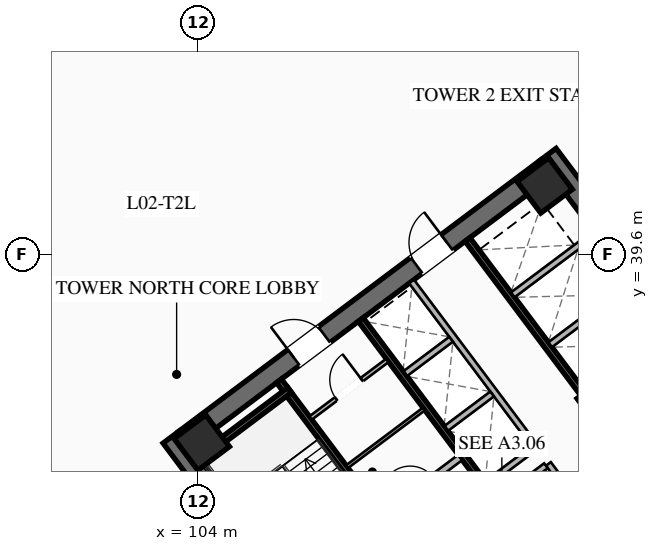
"""IFC4 building model, lengths in metres.
Left out: names, types, materials, properties, quantities, classifications, styles, units other than length and angle.
Written with IfcOpenShell. Run it as: python <this file> out.ifc"""

import sys

from ifc_helpers import new_model, si_unit, direction, frame, frame_2d, origin, origin_2d, place, context, subcontext, project, spatial, rectangle, hollow_rectangle, extrude, element, fill, save


model = new_model("IFC4")
c1 = context("Model", 3, precision=1e-05, world=origin(), true_north=direction((0.0, 1.0)))
c2 = subcontext(c1, "Body", "Model", "MODEL_VIEW")
j1 = project(units=[si_unit("LENGTHUNIT", "METRE"), si_unit("PLANEANGLEUNIT", "RADIAN")], contexts=[c1])
p1 = place(None, origin())
s1 = spatial("IfcSite", under=j1, at=p1, CompositionType="ELEMENT")
p2 = place(p1, origin())
s2 = spatial("IfcBuilding", under=s1, at=p2, CompositionType="ELEMENT")
p3 = place(p2, frame((0.0, 0.0, 10.2)))
s3 = spatial("IfcBuildingStorey", under=s2, at=p3, CompositionType="ELEMENT", Elevation=10.2)
for number, where, z_axis, x_axis in (
    (1, (112.476, 21.107, 0.0), (0.0, 0.0, 1.0), (-0.6, 0.8, 0.0)),
    (2, (115.524, 42.893, 0.0), (0.0, 0.0, 1.0), (0.6, -0.8, 0.0)),
):
    element("IfcWall", number, at=place(p3, frame(where, z_axis=z_axis, x_axis=x_axis)), inside=s3, PredefinedType="SHEAR", context=c2, shape_type="SweptSolid", body=[
        extrude(rectangle(XDim=15.6, YDim=0.65, at=frame_2d((7.8, 0.0))), origin(), (0.0, 0.0, 1.0), 5.4),
    ])
p4 = place(p3, frame((103.571, 33.522, 0.0), z_axis=(0.0, 0.0, 1.0), x_axis=(0.799998028465, 0.600002628705, 0.0)))
e3 = element("IfcWall", 3, at=p4, inside=s3, PredefinedType="SHEAR", context=c2, shape_type="SweptSolid", body=[
    extrude(rectangle(XDim=14.86, YDim=0.65, at=frame_2d((7.43, 0.0))), origin(), (0.0, 0.0, 1.0), 5.4),
])
p5 = place(p4, frame((4.48, 0.0, 0.0)))
e4 = element("IfcOpeningElement", 4, at=p5, cuts=e3, PredefinedType="OPENING", context=c2, shape_type="SweptSolid", body=[
    extrude(rectangle(XDim=1.25, YDim=2.25, at=frame_2d((0.625, 1.125))), frame((0.0, 0.335, 0.0), z_axis=(0.0, -1.0, 0.0), x_axis=(1.0, 0.0, 0.0)), (0.0, 0.0, 1.0), 0.67),
])
p6 = place(p4, frame((9.53, 0.0, 0.0)))
e5 = element("IfcOpeningElement", 5, at=p6, cuts=e3, PredefinedType="OPENING", context=c2, shape_type="SweptSolid", body=[
    extrude(rectangle(XDim=1.25, YDim=2.25, at=frame_2d((0.625, 1.125))), frame((0.0, 0.335, 0.0), z_axis=(0.0, -1.0, 0.0), x_axis=(1.0, 0.0, 0.0)), (0.0, 0.0, 1.0), 0.67),
])
for number, where, z_axis, x_axis in (
    (6, (115.41, 41.87, 0.0), (0.0, 0.0, 1.0), (0.8, 0.6, 0.0)),
    (7, (104.13, 33.41, 0.0), (0.0, 0.0, 1.0), (0.8, 0.6, 0.0)),
):
    element("IfcColumn", number, at=place(p3, frame(where, z_axis=z_axis, x_axis=x_axis)), inside=s3, PredefinedType="COLUMN", context=c2, shape_type="SweptSolid", body=[
        extrude(hollow_rectangle(XDim=1.3, YDim=1.3, WallThickness=0.05, at=origin_2d()), origin(), (0.0, 0.0, 1.0), 5.14),
    ])
p7 = place(p3, frame((111.44, 29.08, 0.0), z_axis=(0.0, 0.0, 1.0), x_axis=(-0.600009827119, 0.799992629566, 0.0)))
e8 = element("IfcWall", 8, at=p7, inside=s3, PredefinedType="SHEAR", context=c2, shape_type="SweptSolid", body=[
    extrude(rectangle(XDim=7.95, YDim=0.2, at=frame_2d((3.975, 0.0))), origin(), (0.0, 0.0, 1.0), 5.14),
])
p8 = place(p7, frame((0.45, 0.0, 0.0)))
e9 = element("IfcOpeningElement", 9, at=p8, cuts=e8, PredefinedType="OPENING", context=c2, shape_type="SweptSolid", body=[
    extrude(rectangle(XDim=1.15, YDim=2.2, at=frame_2d((0.575, 1.1))), frame((0.0, 0.11, 0.0), z_axis=(0.0, -1.0, 0.0), x_axis=(1.0, 0.0, 0.0)), (0.0, 0.0, 1.0), 0.22),
])
p9 = place(p3, frame((104.036, 32.902, 0.0), z_axis=(0.0, 0.0, 1.0), x_axis=(0.800039270442, 0.59994763584, 0.0)))
e10 = element("IfcWall", 10, at=p9, inside=s3, PredefinedType="SHEAR", context=c2, shape_type="SweptSolid", body=[
    extrude(rectangle(XDim=3.73, YDim=0.2, at=frame_2d((1.865, 0.0))), origin(), (0.0, 0.0, 1.0), 5.14),
])
p10 = place(p3, frame((116.56, 34.92, 0.0), z_axis=(0.0, 0.0, 1.0), x_axis=(0.600009827119, -0.799992629566, 0.0)))
e11 = element("IfcWall", 11, at=p10, inside=s3, PredefinedType="SHEAR", context=c2, shape_type="SweptSolid", body=[
    extrude(rectangle(XDim=7.95, YDim=0.2, at=frame_2d((3.975, 0.0))), origin(), (0.0, 0.0, 1.0), 5.14),
])
p11 = place(p10, frame((0.45, 0.0, 0.0)))
e12 = element("IfcOpeningElement", 12, at=p11, cuts=e11, PredefinedType="OPENING", context=c2, shape_type="SweptSolid", body=[
    extrude(rectangle(XDim=1.15, YDim=2.2, at=frame_2d((0.575, 1.1))), frame((0.0, 0.11, 0.0), z_axis=(0.0, -1.0, 0.0), x_axis=(1.0, 0.0, 0.0)), (0.0, 0.0, 1.0), 0.22),
])
p12 = place(p3, frame((116.54, 34.78, 0.0), z_axis=(0.0, 0.0, 1.0), x_axis=(0.799984290658, 0.600020945218, 0.0)))
e13 = element("IfcWall", 13, at=p12, inside=s3, PredefinedType="SHEAR", context=c2, shape_type="SweptSolid", body=[
    extrude(rectangle(XDim=3.73, YDim=0.2, at=frame_2d((1.865, 0.0))), origin(), (0.0, 0.0, 1.0), 5.14),
])
p13 = place(p3, frame((117.938, 26.016, 0.0), z_axis=(0.0, 0.0, 1.0), x_axis=(-0.600005463273, 0.799995902516, 0.0)))
e14 = element("IfcWall", 14, at=p13, inside=s3, PredefinedType="SHEAR", context=c2, shape_type="SweptSolid", body=[
    extrude(rectangle(XDim=14.3, YDim=0.2, at=frame_2d((7.15, 0.0))), origin(), (0.0, 0.0, 1.0), 5.14),
])
p14 = place(p3, frame((110.104, 31.028, 0.0), z_axis=(0.0, 0.0, 1.0), x_axis=(0.800018601094, 0.59997519774, 0.0)))
e15 = element("IfcWall", 15, at=p14, inside=s3, PredefinedType="SOLIDWALL", context=c2, shape_type="SweptSolid", body=[
    extrude(rectangle(XDim=3.15, YDim=0.22, at=frame_2d((1.575, 0.0))), origin(), (0.0, 0.0, 1.0), 2.71),
])
p15 = place(p14, frame((1.1, 0.0, 0.0)))
e16 = element("IfcOpeningElement", 16, at=p15, cuts=e15, PredefinedType="OPENING", context=c2, shape_type="SweptSolid", body=[
    extrude(rectangle(XDim=0.95, YDim=2.05, at=frame_2d((0.475, 1.025))), frame((0.0, 0.12, 0.0), z_axis=(0.0, -1.0, 0.0), x_axis=(1.0, 0.0, 0.0)), (0.0, 0.0, 1.0), 0.24),
])
p16 = place(p3, frame((112.87, 40.09, 0.0), z_axis=(0.0, 0.0, 1.0), x_axis=(0.599975393228, -0.800018454488, 0.0)))
e17 = element("IfcWall", 17, at=p16, inside=s3, PredefinedType="SHEAR", context=c2, shape_type="SweptSolid", body=[
    extrude(rectangle(XDim=6.35, YDim=0.2, at=frame_2d((3.175, 0.0))), origin(), (0.0, 0.0, 1.0), 5.14),
])
for number, where, z_axis, x_axis in (
    (18, (115.59, 36.63, 0.0), (0.0, 0.0, 1.0), (0.8, 0.6, 0.0)),
    (19, (114.36, 38.27, 0.0), (0.0, 0.0, 1.0), (0.8, 0.6, 0.0)),
):
    element("IfcWall", number, at=place(p3, frame(where, z_axis=z_axis, x_axis=x_axis)), inside=s3, PredefinedType="SOLIDWALL", context=c2, shape_type="SweptSolid", body=[
        extrude(rectangle(XDim=3.38, YDim=0.2, at=frame_2d((1.69, 0.0))), origin(), (0.0, 0.0, 1.0), 5.14),
    ])
p17 = place(p3, frame((107.71, 34.22, 0.0), z_axis=(0.0, 0.0, 1.0), x_axis=(0.799981399002, 0.60002480053, 0.0)))
e20 = element("IfcWall", 20, at=p17, inside=s3, PredefinedType="PARTITIONING", context=c2, shape_type="SweptSolid", body=[
    extrude(rectangle(XDim=3.15, YDim=0.135, at=frame_2d((1.575, 0.0))), origin(), (0.0, 0.0, 1.0), 2.71),
])
p18 = place(p17, frame((1.05, 0.0, 0.0)))
e21 = element("IfcOpeningElement", 21, at=p18, cuts=e20, PredefinedType="OPENING", context=c2, shape_type="SweptSolid", body=[
    extrude(rectangle(XDim=1.05, YDim=2.2, at=frame_2d((0.525, 1.1))), frame((0.0, 0.077, 0.0), z_axis=(0.0, -1.0, 0.0), x_axis=(1.0, 0.0, 0.0)), (0.0, 0.0, 1.0), 0.155),
])
p19 = place(p3, frame((108.91, 32.62, 0.0), z_axis=(0.0, 0.0, 1.0), x_axis=(0.800018601094, 0.59997519774, 0.0)))
e22 = element("IfcWall", 22, at=p19, inside=s3, PredefinedType="PARTITIONING", context=c2, shape_type="SweptSolid", body=[
    extrude(rectangle(XDim=3.15, YDim=0.11, at=frame_2d((1.575, 0.0))), origin(), (0.0, 0.0, 1.0), 2.71),
])
p20 = place(p3, frame((119.61, 27.27, 0.0), z_axis=(0.0, 0.0, 1.0), x_axis=(-0.600011488909, 0.79999138319, 0.0)))
e23 = element("IfcWall", 23, at=p20, inside=s3, PredefinedType="SOLIDWALL", context=c2, shape_type="SweptSolid", body=[
    extrude(rectangle(XDim=6.8, YDim=0.2, at=frame_2d((3.4, 0.0))), origin(), (0.0, 0.0, 1.0), 5.14),
])
p21 = place(p20, frame((0.625, 0.0, 0.0)))
e24 = element("IfcOpeningElement", 24, at=p21, cuts=e23, PredefinedType="OPENING", context=c2, shape_type="SweptSolid", body=[
    extrude(rectangle(XDim=1.1, YDim=2.2, at=frame_2d((0.55, 1.1))), frame((0.0, 0.11, 0.0), z_axis=(0.0, -1.0, 0.0), x_axis=(1.0, 0.0, 0.0)), (0.0, 0.0, 1.0), 0.22),
])
p22 = place(p20, frame((2.875, 0.0, 0.0)))
e25 = element("IfcOpeningElement", 25, at=p22, cuts=e23, PredefinedType="OPENING", context=c2, shape_type="SweptSolid", body=[
    extrude(rectangle(XDim=1.1, YDim=2.2, at=frame_2d((0.55, 1.1))), frame((0.0, 0.11, 0.0), z_axis=(0.0, -1.0, 0.0), x_axis=(1.0, 0.0, 0.0)), (0.0, 0.0, 1.0), 0.22),
])
p23 = place(p20, frame((5.125, 0.0, 0.0)))
e26 = element("IfcOpeningElement", 26, at=p23, cuts=e23, PredefinedType="OPENING", context=c2, shape_type="SweptSolid", body=[
    extrude(rectangle(XDim=1.1, YDim=2.2, at=frame_2d((0.55, 1.1))), frame((0.0, 0.11, 0.0), z_axis=(0.0, -1.0, 0.0), x_axis=(1.0, 0.0, 0.0)), (0.0, 0.0, 1.0), 0.22),
])
p24 = place(p3, frame((113.946, 31.522, 0.0), z_axis=(0.0, 0.0, 1.0), x_axis=(0.8, 0.6, 0.0)))
e27 = element("IfcWall", 27, at=p24, inside=s3, PredefinedType="SOLIDWALL", context=c2, shape_type="SweptSolid", body=[
    extrude(rectangle(XDim=1.88, YDim=0.2, at=frame_2d((0.94, 0.0))), origin(), (0.0, 0.0, 1.0), 5.14),
])
p25 = place(p3, frame((115.11, 33.27, 0.0), z_axis=(0.0, 0.0, 1.0), x_axis=(-0.600011488909, 0.79999138319, 0.0)))
e28 = element("IfcWall", 28, at=p25, inside=s3, PredefinedType="SOLIDWALL", context=c2, shape_type="SweptSolid", body=[
    extrude(rectangle(XDim=6.8, YDim=0.2, at=frame_2d((3.4, 0.0))), origin(), (0.0, 0.0, 1.0), 5.14),
])
p26 = place(p3, frame((113.526, 32.082, 0.0), z_axis=(0.0, 0.0, 1.0), x_axis=(0.800046745961, 0.599937666993, 0.0)))
e29 = element("IfcWall", 29, at=p26, inside=s3, PredefinedType="SOLIDWALL", context=c2, shape_type="SweptSolid", body=[
    extrude(rectangle(XDim=1.88, YDim=0.2, at=frame_2d((0.94, 0.0))), origin(), (0.0, 0.0, 1.0), 5.14),
])
p27 = place(p3, frame((112.176, 33.882, 0.0), z_axis=(0.0, 0.0, 1.0), x_axis=(0.8, 0.6, 0.0)))
e30 = element("IfcWall", 30, at=p27, inside=s3, PredefinedType="SOLIDWALL", context=c2, shape_type="SweptSolid", body=[
    extrude(rectangle(XDim=1.88, YDim=0.2, at=frame_2d((0.94, 0.0))), origin(), (0.0, 0.0, 1.0), 5.14),
])
p28 = place(p3, frame((110.826, 35.682, 0.0), z_axis=(0.0, 0.0, 1.0), x_axis=(0.799984418148, 0.600020775241, 0.0)))
e31 = element("IfcWall", 31, at=p28, inside=s3, PredefinedType="SOLIDWALL", context=c2, shape_type="SweptSolid", body=[
    extrude(rectangle(XDim=1.88, YDim=0.2, at=frame_2d((0.94, 0.0))), origin(), (0.0, 0.0, 1.0), 5.14),
])
p29 = place(p5, origin())
e32 = element("IfcDoor", 32, at=p29, inside=s3, OperationType="SINGLE_SWING_LEFT", PredefinedType="DOOR", context=c2, shape_type="SweptSolid", body=[
    extrude(rectangle(XDim=1.25, YDim=2.25, at=frame_2d((0.625, 1.125))), frame((0.0, 0.025, 0.0), z_axis=(0.0, -1.0, 0.0), x_axis=(1.0, 0.0, 0.0)), (0.0, 0.0, 1.0), 0.05),
])
fill(e4, e32)
p30 = place(p6, origin())
e33 = element("IfcDoor", 33, at=p30, inside=s3, OperationType="SINGLE_SWING_RIGHT", PredefinedType="DOOR", context=c2, shape_type="SweptSolid", body=[
    extrude(rectangle(XDim=1.25, YDim=2.25, at=frame_2d((0.625, 1.125))), frame((0.0, 0.025, 0.0), z_axis=(0.0, -1.0, 0.0), x_axis=(1.0, 0.0, 0.0)), (0.0, 0.0, 1.0), 0.05),
])
fill(e5, e33)
p31 = place(p18, origin())
e34 = element("IfcDoor", 34, at=p31, inside=s3, OperationType="SINGLE_SWING_RIGHT", PredefinedType="DOOR", context=c2, shape_type="SweptSolid", body=[
    extrude(rectangle(XDim=1.05, YDim=2.2, at=frame_2d((0.525, 1.1))), frame((0.0, 0.025, 0.0), z_axis=(0.0, -1.0, 0.0), x_axis=(1.0, 0.0, 0.0)), (0.0, 0.0, 1.0), 0.05),
])
fill(e21, e34)
save(model, sys.argv[1])
